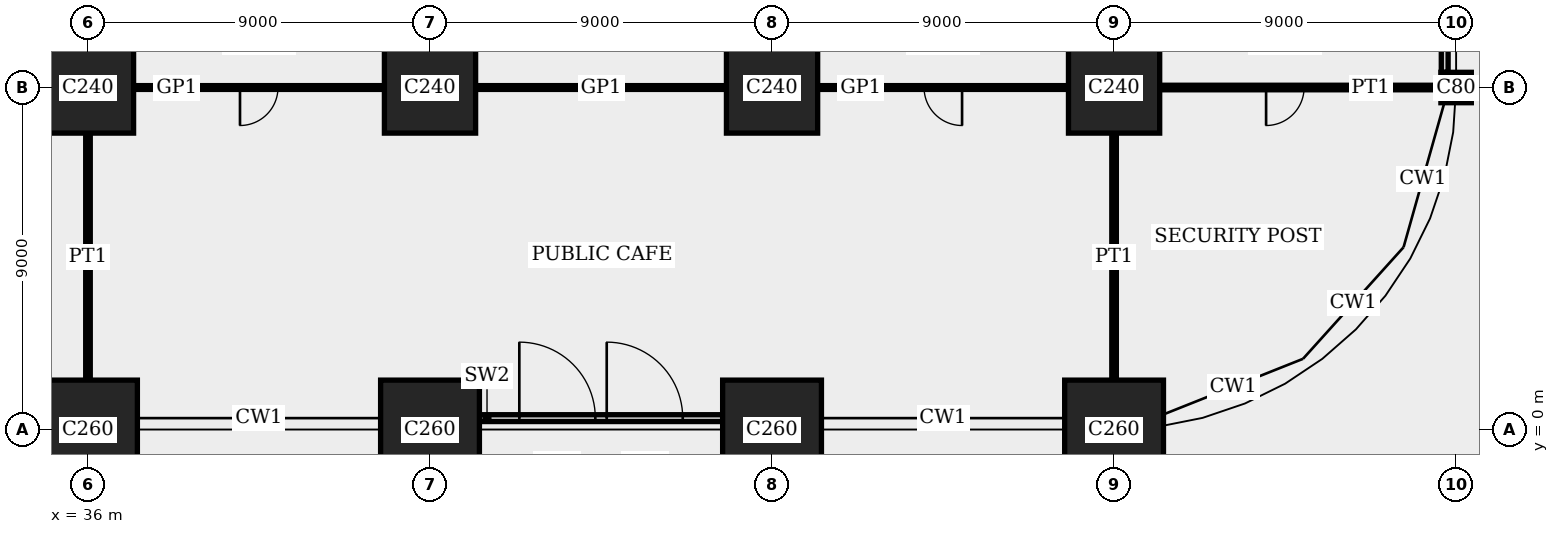
"""IFC4 building model, lengths in metres.
Left out: names, types, materials, properties, quantities, classifications, styles, units other than length and angle.
Written with IfcOpenShell. Run it as: python <this file> out.ifc"""

import sys

from ifc_helpers import new_model, si_unit, direction, frame, frame_2d, origin, origin_2d, place, context, subcontext, project, spatial, rectangle, extrude, element, fill, save


model = new_model("IFC4")
c1 = context("Model", 3, precision=1e-05, world=origin(), true_north=direction((0.0, 1.0)))
c2 = subcontext(c1, "Body", "Model", "MODEL_VIEW")
j1 = project(units=[si_unit("LENGTHUNIT", "METRE"), si_unit("PLANEANGLEUNIT", "RADIAN")], contexts=[c1])
p1 = place(None, origin())
s1 = spatial("IfcSite", under=j1, at=p1, CompositionType="ELEMENT")
p2 = place(p1, origin())
s2 = spatial("IfcBuilding", under=s1, at=p2, CompositionType="ELEMENT")
p3 = place(p2, origin())
s3 = spatial("IfcBuildingStorey", under=s2, at=p3, CompositionType="ELEMENT", Elevation=0.0)
p4 = place(p3, frame((36.0, 0.0, 0.0), z_axis=(0.0, 0.0, 1.0), x_axis=(1.0, 0.0, 0.0)))
e1 = element("IfcColumn", 1, at=p4, inside=s3, PredefinedType="COLUMN", context=c2, shape_type="SweptSolid", body=[
    extrude(rectangle(XDim=2.6, YDim=2.6, at=origin_2d()), origin(), (0.0, 0.0, 1.0), 5.4),
])
p5 = place(p3, frame((36.0, 9.0, 0.0), z_axis=(0.0, 0.0, 1.0), x_axis=(1.0, 0.0, 0.0)))
e2 = element("IfcColumn", 2, at=p5, inside=s3, PredefinedType="COLUMN", context=c2, shape_type="SweptSolid", body=[
    extrude(rectangle(XDim=2.4, YDim=2.4, at=origin_2d()), origin(), (0.0, 0.0, 1.0), 5.4),
])
p6 = place(p3, frame((45.0, 0.0, 0.0), z_axis=(0.0, 0.0, 1.0), x_axis=(1.0, 0.0, 0.0)))
e3 = element("IfcColumn", 3, at=p6, inside=s3, PredefinedType="COLUMN", context=c2, shape_type="SweptSolid", body=[
    extrude(rectangle(XDim=2.6, YDim=2.6, at=origin_2d()), origin(), (0.0, 0.0, 1.0), 5.4),
])
p7 = place(p3, frame((45.0, 9.0, 0.0), z_axis=(0.0, 0.0, 1.0), x_axis=(1.0, 0.0, 0.0)))
e4 = element("IfcColumn", 4, at=p7, inside=s3, PredefinedType="COLUMN", context=c2, shape_type="SweptSolid", body=[
    extrude(rectangle(XDim=2.4, YDim=2.4, at=origin_2d()), origin(), (0.0, 0.0, 1.0), 5.4),
])
p8 = place(p3, frame((54.0, 0.0, 0.0), z_axis=(0.0, 0.0, 1.0), x_axis=(1.0, 0.0, 0.0)))
e5 = element("IfcColumn", 5, at=p8, inside=s3, PredefinedType="COLUMN", context=c2, shape_type="SweptSolid", body=[
    extrude(rectangle(XDim=2.6, YDim=2.6, at=origin_2d()), origin(), (0.0, 0.0, 1.0), 5.4),
])
p9 = place(p3, frame((54.0, 9.0, 0.0), z_axis=(0.0, 0.0, 1.0), x_axis=(1.0, 0.0, 0.0)))
e6 = element("IfcColumn", 6, at=p9, inside=s3, PredefinedType="COLUMN", context=c2, shape_type="SweptSolid", body=[
    extrude(rectangle(XDim=2.4, YDim=2.4, at=origin_2d()), origin(), (0.0, 0.0, 1.0), 5.4),
])
p10 = place(p3, frame((63.0, 0.0, 0.0), z_axis=(0.0, 0.0, 1.0), x_axis=(1.0, 0.0, 0.0)))
e7 = element("IfcColumn", 7, at=p10, inside=s3, PredefinedType="COLUMN", context=c2, shape_type="SweptSolid", body=[
    extrude(rectangle(XDim=2.6, YDim=2.6, at=origin_2d()), origin(), (0.0, 0.0, 1.0), 5.4),
])
p11 = place(p3, frame((63.0, 9.0, 0.0), z_axis=(0.0, 0.0, 1.0), x_axis=(1.0, 0.0, 0.0)))
e8 = element("IfcColumn", 8, at=p11, inside=s3, PredefinedType="COLUMN", context=c2, shape_type="SweptSolid", body=[
    extrude(rectangle(XDim=2.4, YDim=2.4, at=origin_2d()), origin(), (0.0, 0.0, 1.0), 5.4),
])
p12 = place(p3, frame((72.0, 9.0, 0.0), z_axis=(0.0, 0.0, 1.0), x_axis=(1.0, 0.0, 0.0)))
e9 = element("IfcColumn", 9, at=p12, inside=s3, PredefinedType="COLUMN", context=c2, shape_type="SweptSolid", body=[
    extrude(rectangle(XDim=0.8, YDim=0.8, at=origin_2d()), origin(), (0.0, 0.0, 1.0), 5.4),
])
p13 = place(p3, frame((46.3, 0.3, 0.0), z_axis=(0.0, 0.0, 1.0), x_axis=(1.0, 0.0, 0.0)))
e10 = element("IfcWall", 10, at=p13, inside=s3, PredefinedType="SOLIDWALL", context=c2, shape_type="SweptSolid", body=[
    extrude(rectangle(XDim=6.4, YDim=0.18, at=frame_2d((3.2, 0.0))), origin(), (0.0, 0.0, 1.0), 4.3),
])
p14 = place(p13, frame((1.05, 0.0, 0.0)))
e11 = element("IfcOpeningElement", 11, at=p14, cuts=e10, PredefinedType="OPENING", context=c2, shape_type="SweptSolid", body=[
    extrude(rectangle(XDim=2.0, YDim=3.0, at=frame_2d((1.0, 1.5))), frame((0.0, 0.1, 0.0), z_axis=(0.0, -1.0, 0.0), x_axis=(1.0, 0.0, 0.0)), (0.0, 0.0, 1.0), 0.2),
])
p15 = place(p13, frame((3.35, 0.0, 0.0)))
e12 = element("IfcOpeningElement", 12, at=p15, cuts=e10, PredefinedType="OPENING", context=c2, shape_type="SweptSolid", body=[
    extrude(rectangle(XDim=2.0, YDim=3.0, at=frame_2d((1.0, 1.5))), frame((0.0, 0.1, 0.0), z_axis=(0.0, -1.0, 0.0), x_axis=(1.0, 0.0, 0.0)), (0.0, 0.0, 1.0), 0.2),
])
p16 = place(p3, frame((71.7, 9.4, 0.0), z_axis=(0.0, 0.0, 1.0), x_axis=(0.0, 1.0, 0.0)))
e13 = element("IfcWall", 13, at=p16, inside=s3, PredefinedType="SOLIDWALL", context=c2, shape_type="SweptSolid", body=[
    extrude(rectangle(XDim=8.2, YDim=0.18, at=frame_2d((4.1, 0.0))), origin(), (0.0, 0.0, 1.0), 4.3),
])
p17 = place(p16, frame((1.95, 0.0, 0.0)))
e14 = element("IfcOpeningElement", 14, at=p17, cuts=e13, PredefinedType="OPENING", context=c2, shape_type="SweptSolid", body=[
    extrude(rectangle(XDim=2.0, YDim=3.0, at=frame_2d((1.0, 1.5))), frame((0.0, 0.1, 0.0), z_axis=(0.0, -1.0, 0.0), x_axis=(1.0, 0.0, 0.0)), (0.0, 0.0, 1.0), 0.2),
])
p18 = place(p16, frame((4.25, 0.0, 0.0)))
e15 = element("IfcOpeningElement", 15, at=p18, cuts=e13, PredefinedType="OPENING", context=c2, shape_type="SweptSolid", body=[
    extrude(rectangle(XDim=2.0, YDim=3.0, at=frame_2d((1.0, 1.5))), frame((0.0, 0.1, 0.0), z_axis=(0.0, -1.0, 0.0), x_axis=(1.0, 0.0, 0.0)), (0.0, 0.0, 1.0), 0.2),
])
p19 = place(p3, frame((37.2, 9.0, 0.0), z_axis=(0.0, 0.0, 1.0), x_axis=(1.0, 0.0, 0.0)))
e16 = element("IfcWall", 16, at=p19, inside=s3, PredefinedType="PARTITIONING", context=c2, shape_type="SweptSolid", body=[
    extrude(rectangle(XDim=6.6, YDim=0.1, at=frame_2d((3.3, 0.0))), origin(), (0.0, 0.0, 1.0), 4.3),
])
p20 = place(p19, frame((2.8, 0.0, 0.0)))
e17 = element("IfcOpeningElement", 17, at=p20, cuts=e16, PredefinedType="OPENING", context=c2, shape_type="SweptSolid", body=[
    extrude(rectangle(XDim=1.0, YDim=2.4, at=frame_2d((0.5, 1.2))), frame((0.0, 0.06, 0.0), z_axis=(0.0, -1.0, 0.0), x_axis=(1.0, 0.0, 0.0)), (0.0, 0.0, 1.0), 0.12),
])
p21 = place(p3, frame((46.2, 9.0, 0.0), z_axis=(0.0, 0.0, 1.0), x_axis=(1.0, 0.0, 0.0)))
e18 = element("IfcWall", 18, at=p21, inside=s3, PredefinedType="PARTITIONING", context=c2, shape_type="SweptSolid", body=[
    extrude(rectangle(XDim=6.6, YDim=0.1, at=frame_2d((3.3, 0.0))), origin(), (0.0, 0.0, 1.0), 4.3),
])
p22 = place(p3, frame((55.2, 9.0, 0.0), z_axis=(0.0, 0.0, 1.0), x_axis=(1.0, 0.0, 0.0)))
e19 = element("IfcWall", 19, at=p22, inside=s3, PredefinedType="PARTITIONING", context=c2, shape_type="SweptSolid", body=[
    extrude(rectangle(XDim=6.6, YDim=0.1, at=frame_2d((3.3, 0.0))), origin(), (0.0, 0.0, 1.0), 4.3),
])
p23 = place(p22, frame((2.8, 0.0, 0.0)))
e20 = element("IfcOpeningElement", 20, at=p23, cuts=e19, PredefinedType="OPENING", context=c2, shape_type="SweptSolid", body=[
    extrude(rectangle(XDim=1.0, YDim=2.4, at=frame_2d((0.5, 1.2))), frame((0.0, 0.06, 0.0), z_axis=(0.0, -1.0, 0.0), x_axis=(1.0, 0.0, 0.0)), (0.0, 0.0, 1.0), 0.12),
])
for number, where, z_axis, x_axis in (
    (21, (36.0, 1.3, 0.0), (0.0, 0.0, 1.0), (0.0, 1.0, 0.0)),
    (22, (63.0, 1.3, 0.0), (0.0, 0.0, 1.0), (0.0, 1.0, 0.0)),
):
    element("IfcWall", number, at=place(p3, frame(where, z_axis=z_axis, x_axis=x_axis)), inside=s3, PredefinedType="PARTITIONING", context=c2, shape_type="SweptSolid", body=[
        extrude(rectangle(XDim=6.5, YDim=0.12, at=frame_2d((3.25, 0.0))), origin(), (0.0, 0.0, 1.0), 4.3),
    ])
p24 = place(p3, frame((64.2, 9.0, 0.0), z_axis=(0.0, 0.0, 1.0), x_axis=(1.0, 0.0, 0.0)))
e23 = element("IfcWall", 23, at=p24, inside=s3, PredefinedType="PARTITIONING", context=c2, shape_type="SweptSolid", body=[
    extrude(rectangle(XDim=7.4, YDim=0.12, at=frame_2d((3.7, 0.0))), origin(), (0.0, 0.0, 1.0), 4.3),
])
p25 = place(p24, frame((2.8, 0.0, 0.0)))
e24 = element("IfcOpeningElement", 24, at=p25, cuts=e23, PredefinedType="OPENING", context=c2, shape_type="SweptSolid", body=[
    extrude(rectangle(XDim=1.0, YDim=2.4, at=frame_2d((0.5, 1.2))), frame((0.0, 0.07, 0.0), z_axis=(0.0, -1.0, 0.0), x_axis=(1.0, 0.0, 0.0)), (0.0, 0.0, 1.0), 0.14),
])
p26 = place(p14, origin())
e25 = element("IfcDoor", 25, at=p26, inside=s3, OperationType="DOUBLE_DOOR_DOUBLE_SWING", PredefinedType="DOOR", context=c2, shape_type="SweptSolid", body=[
    extrude(rectangle(XDim=2.0, YDim=3.0, at=frame_2d((1.0, 1.5))), frame((0.0, 0.025, 0.0), z_axis=(0.0, -1.0, 0.0), x_axis=(1.0, 0.0, 0.0)), (0.0, 0.0, 1.0), 0.05),
])
fill(e11, e25)
p27 = place(p15, origin())
e26 = element("IfcDoor", 26, at=p27, inside=s3, OperationType="DOUBLE_DOOR_DOUBLE_SWING", PredefinedType="DOOR", context=c2, shape_type="SweptSolid", body=[
    extrude(rectangle(XDim=2.0, YDim=3.0, at=frame_2d((1.0, 1.5))), frame((0.0, 0.025, 0.0), z_axis=(0.0, -1.0, 0.0), x_axis=(1.0, 0.0, 0.0)), (0.0, 0.0, 1.0), 0.05),
])
fill(e12, e26)
p28 = place(p20, origin())
e27 = element("IfcDoor", 27, at=p28, inside=s3, OperationType="SINGLE_SWING_LEFT", PredefinedType="DOOR", context=c2, shape_type="SweptSolid", body=[
    extrude(rectangle(XDim=1.0, YDim=2.4, at=frame_2d((0.5, 1.2))), frame((0.0, 0.02, 0.0), z_axis=(0.0, -1.0, 0.0), x_axis=(1.0, 0.0, 0.0)), (0.0, 0.0, 1.0), 0.04),
])
fill(e17, e27)
p29 = place(p23, origin())
e28 = element("IfcDoor", 28, at=p29, inside=s3, OperationType="SINGLE_SWING_RIGHT", PredefinedType="DOOR", context=c2, shape_type="SweptSolid", body=[
    extrude(rectangle(XDim=1.0, YDim=2.4, at=frame_2d((0.5, 1.2))), frame((0.0, 0.02, 0.0), z_axis=(0.0, -1.0, 0.0), x_axis=(1.0, 0.0, 0.0)), (0.0, 0.0, 1.0), 0.04),
])
fill(e20, e28)
p30 = place(p25, origin())
e29 = element("IfcDoor", 29, at=p30, inside=s3, OperationType="SINGLE_SWING_LEFT", PredefinedType="DOOR", context=c2, shape_type="SweptSolid", body=[
    extrude(rectangle(XDim=1.0, YDim=2.4, at=frame_2d((0.5, 1.2))), frame((0.0, 0.025, 0.0), z_axis=(0.0, -1.0, 0.0), x_axis=(1.0, 0.0, 0.0)), (0.0, 0.0, 1.0), 0.05),
])
fill(e24, e29)
save(model, sys.argv[1])
